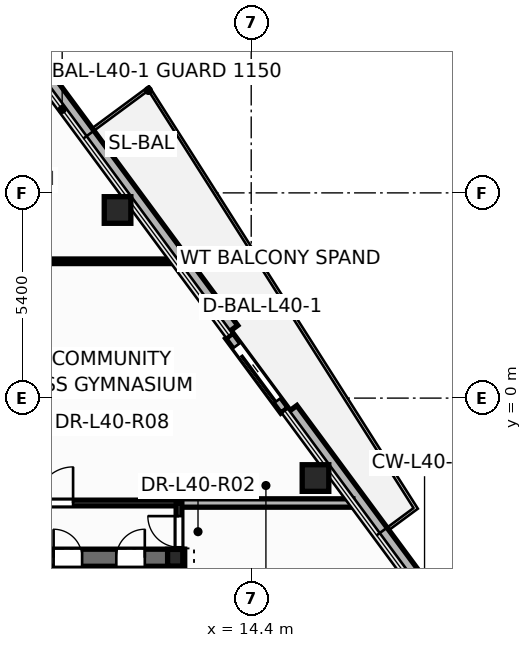
"""IFC4 building model, lengths in metres.
Left out: names, types, materials, properties, quantities, classifications, styles, units other than length and angle.
Written with IfcOpenShell. Run it as: python <this file> out.ifc"""

import sys

from ifc_helpers import new_model, si_unit, direction, frame, frame_2d, origin, origin_2d, place, context, subcontext, project, spatial, rectangle, hollow_circle, i_section, extrude, element, fill, save


model = new_model("IFC4")
c1 = context("Model", 3, precision=1e-05, world=origin(), true_north=direction((0.0, 1.0)))
c2 = subcontext(c1, "Body", "Model", "MODEL_VIEW")
j1 = project(units=[si_unit("LENGTHUNIT", "METRE"), si_unit("PLANEANGLEUNIT", "RADIAN")], contexts=[c1])
p1 = place(None, origin())
s1 = spatial("IfcSite", under=j1, at=p1, CompositionType="ELEMENT")
p2 = place(p1, origin())
s2 = spatial("IfcBuilding", under=s1, at=p2, CompositionType="ELEMENT")
p3 = place(p2, frame((0.0, 0.0, 154.5)))
s3 = spatial("IfcBuildingStorey", under=s2, at=p3, CompositionType="ELEMENT", Elevation=154.5)
for number, where, z_axis, x_axis in (
    (1, (16.092, -2.103, 0.0), (0.0, 0.0, 1.0), (1.0, 0.0, 0.0)),
    (2, (10.883, 4.95, 0.0), (0.0, 0.0, 1.0), (1.0, 0.0, 0.0)),
):
    element("IfcColumn", number, at=place(p3, frame(where, z_axis=z_axis, x_axis=x_axis)), inside=s3, PredefinedType="COLUMN", context=c2, shape_type="SweptSolid", body=[
        extrude(hollow_circle(Radius=0.35, WallThickness=0.03, at=origin_2d()), origin(), (0.0, 0.0, 1.0), 3.6),
    ])
p4 = place(p3, frame((12.4, -4.2, 0.0), z_axis=(0.0, 0.0, 1.0), x_axis=(1.0, 0.0, 0.0)))
e3 = element("IfcColumn", 3, at=p4, inside=s3, PredefinedType="COLUMN", context=c2, shape_type="SweptSolid", body=[
    extrude(i_section(OverallWidth=0.4, OverallDepth=0.44, WebThickness=0.028, FlangeThickness=0.04, at=origin_2d()), origin(), (0.0, 0.0, 1.0), 3.6),
])
p5 = place(p3, frame((22.723, -10.14, -0.2), z_axis=(0.0, 0.0, 1.0), x_axis=(-0.59407502275, 0.804409639017, 0.0)))
e4 = element("IfcWall", 4, at=p5, inside=s3, PredefinedType="PARAPET", context=c2, shape_type="SweptSolid", body=[
    extrude(rectangle(XDim=12.23, YDim=0.36, at=frame_2d((6.115, 0.0))), origin(), (0.0, 0.0, 1.0), 0.38),
])
p6 = place(p3, frame((13.901, 1.806, -0.2), z_axis=(0.0, 0.0, 1.0), x_axis=(-0.594075751219, 0.804409101026, 0.0)))
e5 = element("IfcWall", 5, at=p6, inside=s3, PredefinedType="PARAPET", context=c2, shape_type="SweptSolid", body=[
    extrude(rectangle(XDim=14.632, YDim=0.36, at=frame_2d((7.316, 0.0))), origin(), (0.0, 0.0, 1.0), 0.38),
])
p7 = place(p3, frame((15.275, -0.324, -0.015), z_axis=(0.0, 0.0, 1.0), x_axis=(-0.594092829232, 0.804396488216, 0.0)))
e6 = element("IfcWall", 6, at=p7, inside=s3, PredefinedType="STANDARD", context=c2, shape_type="SweptSolid", body=[
    extrude(rectangle(XDim=2.44, YDim=0.24, at=frame_2d((1.22, 0.0))), origin(), (0.0, 0.0, 1.0), 2.807),
])
p8 = place(p7, frame((0.32, 0.0, 0.015)))
e7 = element("IfcOpeningElement", 7, at=p8, cuts=e6, PredefinedType="OPENING", context=c2, shape_type="SweptSolid", body=[
    extrude(rectangle(XDim=1.806, YDim=2.204, at=frame_2d((0.9, 1.102))), frame((0.0, 0.13, 0.0), z_axis=(0.0, -1.0, 0.0), x_axis=(1.0, 0.0, 0.0)), (0.0, 0.0, 1.0), 0.26),
])
p9 = place(p3, frame((10.2, -5.52, 0.0), z_axis=(0.0, 0.0, 1.0), x_axis=(0.0, 1.0, 0.0)))
e8 = element("IfcWall", 8, at=p9, inside=s3, PredefinedType="PARTITIONING", context=c2, shape_type="SweptSolid", body=[
    extrude(rectangle(XDim=1.12, YDim=0.12, at=frame_2d((0.56, 0.0))), origin(), (0.0, 0.0, 1.0), 3.35),
])
p10 = place(p3, frame((-12.65, -4.2, 0.0), z_axis=(0.0, 0.0, 1.0), x_axis=(1.0, 0.0, 0.0)))
e9 = element("IfcWall", 9, at=p10, inside=s3, PredefinedType="SHEAR", context=c2, shape_type="SweptSolid", body=[
    extrude(rectangle(XDim=25.3, YDim=0.45, at=frame_2d((12.65, 0.0))), origin(), (0.0, 0.0, 1.0), 3.6),
])
p11 = place(p10, frame((1.85, 0.0, 0.0)))
e10 = element("IfcOpeningElement", 10, at=p11, cuts=e9, PredefinedType="OPENING", context=c2, shape_type="SweptSolid", body=[
    extrude(rectangle(XDim=0.756, YDim=2.054, at=frame_2d((0.375, 1.027))), frame((0.0, 0.235, 0.0), z_axis=(0.0, -1.0, 0.0), x_axis=(1.0, 0.0, 0.0)), (0.0, 0.0, 1.0), 0.47),
])
p12 = place(p10, frame((21.85, 0.0, 0.0)))
e11 = element("IfcOpeningElement", 11, at=p12, cuts=e9, PredefinedType="OPENING", context=c2, shape_type="SweptSolid", body=[
    extrude(rectangle(XDim=0.756, YDim=2.054, at=frame_2d((0.375, 1.027))), frame((0.0, 0.235, 0.0), z_axis=(0.0, -1.0, 0.0), x_axis=(1.0, 0.0, 0.0)), (0.0, 0.0, 1.0), 0.47),
])
p13 = place(p10, frame((23.5, 0.0, 0.0)))
e12 = element("IfcOpeningElement", 12, at=p13, cuts=e9, PredefinedType="OPENING", context=c2, shape_type="SweptSolid", body=[
    extrude(rectangle(XDim=0.756, YDim=2.054, at=frame_2d((0.375, 1.027))), frame((0.0, 0.235, 0.0), z_axis=(0.0, -1.0, 0.0), x_axis=(1.0, 0.0, 0.0)), (0.0, 0.0, 1.0), 0.47),
])
p14 = place(p10, frame((5.85, 0.0, 0.0)))
e13 = element("IfcOpeningElement", 13, at=p14, cuts=e9, PredefinedType="OPENING", context=c2, shape_type="SweptSolid", body=[
    extrude(rectangle(XDim=1.006, YDim=2.104, at=frame_2d((0.5, 1.052))), frame((0.0, 0.235, 0.0), z_axis=(0.0, -1.0, 0.0), x_axis=(1.0, 0.0, 0.0)), (0.0, 0.0, 1.0), 0.47),
])
p15 = place(p10, frame((10.35, 0.0, 0.0)))
e14 = element("IfcOpeningElement", 14, at=p15, cuts=e9, PredefinedType="OPENING", context=c2, shape_type="SweptSolid", body=[
    extrude(rectangle(XDim=1.406, YDim=2.154, at=frame_2d((0.7, 1.077))), frame((0.0, 0.235, 0.0), z_axis=(0.0, -1.0, 0.0), x_axis=(1.0, 0.0, 0.0)), (0.0, 0.0, 1.0), 0.47),
])
p16 = place(p10, frame((18.45, 0.0, 0.0)))
e15 = element("IfcOpeningElement", 15, at=p16, cuts=e9, PredefinedType="OPENING", context=c2, shape_type="SweptSolid", body=[
    extrude(rectangle(XDim=1.006, YDim=2.104, at=frame_2d((0.5, 1.052))), frame((0.0, 0.235, 0.0), z_axis=(0.0, -1.0, 0.0), x_axis=(1.0, 0.0, 0.0)), (0.0, 0.0, 1.0), 0.47),
])
p17 = place(p3, frame((12.4, -13.85, 0.0), z_axis=(0.0, 0.0, 1.0), x_axis=(0.0, 1.0, 0.0)))
e16 = element("IfcWall", 16, at=p17, inside=s3, PredefinedType="SHEAR", context=c2, shape_type="SweptSolid", body=[
    extrude(rectangle(XDim=9.4, YDim=0.45, at=frame_2d((4.7, 0.0))), origin(), (0.0, 0.0, 1.0), 3.6),
])
p18 = place(p3, frame((2.36, 3.6, 0.0), z_axis=(0.0, 0.0, 1.0), x_axis=(1.0, 0.0, 0.0)))
e17 = element("IfcWall", 17, at=p18, inside=s3, PredefinedType="PARTITIONING", context=c2, shape_type="SweptSolid", body=[
    extrude(rectangle(XDim=10.017, YDim=0.12, at=frame_2d((5.008, 0.0))), origin(), (0.0, 0.0, 1.0), 2.325),
])
p19 = place(p3, frame((5.1, -2.76, 0.0), z_axis=(0.0, 0.0, 1.0), x_axis=(1.0, 0.0, 0.0)))
e18 = element("IfcWall", 18, at=p19, inside=s3, PredefinedType="PARTITIONING", context=c2, shape_type="SweptSolid", body=[
    extrude(rectangle(XDim=7.4, YDim=0.15, at=frame_2d((3.7, 0.0))), origin(), (0.0, 0.0, 1.0), 2.325),
])
p20 = place(p19, frame((3.663, 0.0, 0.0)))
e19 = element("IfcOpeningElement", 19, at=p20, cuts=e18, PredefinedType="OPENING", context=c2, shape_type="SweptSolid", body=[
    extrude(rectangle(XDim=0.956, YDim=2.104, at=frame_2d((0.475, 1.052))), frame((0.0, 0.085, 0.0), z_axis=(0.0, -1.0, 0.0), x_axis=(1.0, 0.0, 0.0)), (0.0, 0.0, 1.0), 0.17),
])
p21 = place(p3, frame((12.5, -2.76, 0.0), z_axis=(0.0, 0.0, 1.0), x_axis=(1.0, 0.0, 0.0)))
e20 = element("IfcWall", 20, at=p21, inside=s3, PredefinedType="PARTITIONING", context=c2, shape_type="SweptSolid", body=[
    extrude(rectangle(XDim=4.574, YDim=0.22, at=frame_2d((2.287, 0.0))), origin(), (0.0, 0.0, 1.0), 2.792),
])
p22 = place(p3, frame((12.5, -4.24, 0.0), z_axis=(0.0, 0.0, 1.0), x_axis=(0.0, 1.0, 0.0)))
e21 = element("IfcWall", 21, at=p22, inside=s3, PredefinedType="PARTITIONING", context=c2, shape_type="SweptSolid", body=[
    extrude(rectangle(XDim=1.48, YDim=0.15, at=frame_2d((0.74, 0.0))), origin(), (0.0, 0.0, 1.0), 2.325),
])
p23 = place(p22, frame((0.315, 0.0, 0.0)))
e22 = element("IfcOpeningElement", 22, at=p23, cuts=e21, PredefinedType="OPENING", context=c2, shape_type="SweptSolid", body=[
    extrude(rectangle(XDim=0.826, YDim=2.104, at=frame_2d((0.41, 1.052))), frame((0.0, 0.085, 0.0), z_axis=(0.0, -1.0, 0.0), x_axis=(1.0, 0.0, 0.0)), (0.0, 0.0, 1.0), 0.17),
])
p24 = place(p8, origin())
e23 = element("IfcDoor", 23, at=p24, inside=s3, OperationType="SLIDING_TO_LEFT", PredefinedType="DOOR", context=c2, shape_type="SweptSolid", body=[
    extrude(rectangle(XDim=1.8, YDim=2.2, at=frame_2d((0.9, 1.1))), frame((0.0, 0.025, 0.0), z_axis=(0.0, -1.0, 0.0), x_axis=(1.0, 0.0, 0.0)), (0.0, 0.0, 1.0), 0.05),
])
fill(e7, e23)
p25 = place(p12, origin())
e24 = element("IfcDoor", 24, at=p25, inside=s3, OperationType="SINGLE_SWING_LEFT", PredefinedType="DOOR", context=c2, shape_type="SweptSolid", body=[
    extrude(rectangle(XDim=0.75, YDim=2.05, at=frame_2d((0.375, 1.025))), frame((0.0, 0.025, 0.0), z_axis=(0.0, -1.0, 0.0), x_axis=(1.0, 0.0, 0.0)), (0.0, 0.0, 1.0), 0.05),
])
fill(e11, e24)
p26 = place(p13, origin())
e25 = element("IfcDoor", 25, at=p26, inside=s3, OperationType="SINGLE_SWING_RIGHT", PredefinedType="DOOR", context=c2, shape_type="SweptSolid", body=[
    extrude(rectangle(XDim=0.75, YDim=2.05, at=frame_2d((0.375, 1.025))), frame((0.0, 0.025, 0.0), z_axis=(0.0, -1.0, 0.0), x_axis=(1.0, 0.0, 0.0)), (0.0, 0.0, 1.0), 0.05),
])
fill(e12, e25)
p27 = place(p23, origin())
e26 = element("IfcDoor", 26, at=p27, inside=s3, OperationType="SINGLE_SWING_RIGHT", PredefinedType="DOOR", context=c2, shape_type="SweptSolid", body=[
    extrude(rectangle(XDim=0.82, YDim=2.1, at=frame_2d((0.41, 1.05))), frame((0.0, 0.025, 0.0), z_axis=(0.0, -1.0, 0.0), x_axis=(1.0, 0.0, 0.0)), (0.0, 0.0, 1.0), 0.05),
])
fill(e22, e26)
p28 = place(p20, origin())
e27 = element("IfcDoor", 27, at=p28, inside=s3, OperationType="SINGLE_SWING_RIGHT", PredefinedType="DOOR", context=c2, shape_type="SweptSolid", body=[
    extrude(rectangle(XDim=0.95, YDim=2.1, at=frame_2d((0.475, 1.05))), frame((0.0, 0.025, 0.0), z_axis=(0.0, -1.0, 0.0), x_axis=(1.0, 0.0, 0.0)), (0.0, 0.0, 1.0), 0.05),
])
fill(e19, e27)
save(model, sys.argv[1])
